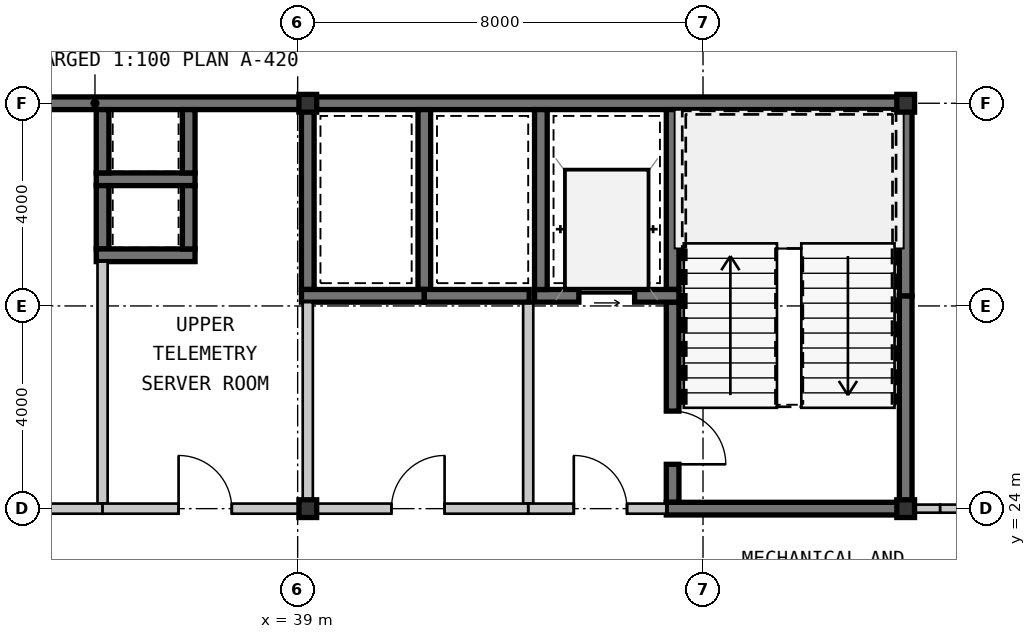
"""IFC4 building model, lengths in metres.
Left out: names, types, materials, properties, quantities, classifications, styles, units other than length and angle.
Written with IfcOpenShell. Run it as: python <this file> out.ifc"""

import sys

from ifc_helpers import new_model, si_unit, direction, frame, frame_2d, origin, origin_2d, place, context, subcontext, project, spatial, rectangle, hollow_rectangle, extrude, source, transform, mapped, element, fill, save


model = new_model("IFC4")
c1 = context("Model", 3, precision=1e-05, world=origin(), true_north=direction((0.0, 1.0)))
c2 = subcontext(c1, "Body", "Model", "MODEL_VIEW")
j1 = project(units=[si_unit("LENGTHUNIT", "METRE"), si_unit("PLANEANGLEUNIT", "RADIAN")], contexts=[c1])
p1 = place(None, origin())
s1 = spatial("IfcSite", under=j1, at=p1, CompositionType="ELEMENT")
p2 = place(p1, origin())
s2 = spatial("IfcBuilding", under=s1, at=p2, CompositionType="ELEMENT")
p3 = place(p2, frame((0.0, 0.0, 207.2)))
s3 = spatial("IfcBuildingStorey", under=s2, at=p3, CompositionType="ELEMENT", Elevation=207.2)
m1 = source(origin(), c2, "Body", "SweptSolid", [
    extrude(hollow_rectangle(XDim=0.35, YDim=0.35, WallThickness=0.016, at=origin_2d()), origin(), (0.0, 0.0, 1.0), 4.2),
])
for number, where, z_axis, x_axis in (
    (1, (39.2, 24.0, 0.0), (0.0, 0.0, 1.0), (1.0, 0.0, 0.0)),
    (2, (51.0, 24.0, 0.0), (0.0, 0.0, 1.0), (1.0, 0.0, 0.0)),
    (3, (39.2, 32.0, 0.0), (0.0, 0.0, 1.0), (1.0, 0.0, 0.0)),
    (4, (51.0, 32.0, 0.0), (0.0, 0.0, 1.0), (1.0, 0.0, 0.0)),
):
    element("IfcColumn", number, at=place(p3, frame(where, z_axis=z_axis, x_axis=x_axis)), inside=s3, PredefinedType="COLUMN", context=c2, shape_type="MappedRepresentation", body=[
        mapped(m1, transform((0.0, 0.0, 0.0), scale=1.0)),
    ])
m2 = source(origin(), c2, "Body", "SweptSolid", [
    extrude(rectangle(XDim=11.2, YDim=0.25, at=frame_2d((5.6, 0.0))), origin(), (0.0, 0.0, 1.0), 3.78),
])
p4 = place(p3, frame((28.0, 32.0, 0.0), z_axis=(0.0, 0.0, 1.0), x_axis=(1.0, 0.0, 0.0)))
e5 = element("IfcWall", 5, at=p4, inside=s3, PredefinedType="SHEAR", context=c2, shape_type="MappedRepresentation", body=[
    mapped(m2, transform((0.0, 0.0, 0.0), scale=1.0)),
])
m3 = source(origin(), c2, "Body", "SweptSolid", [
    extrude(rectangle(XDim=11.925, YDim=0.25, at=frame_2d((5.962, 0.0))), origin(), (0.0, 0.0, 1.0), 3.78),
])
p5 = place(p3, frame((39.2, 32.0, 0.0), z_axis=(0.0, 0.0, 1.0), x_axis=(1.0, 0.0, 0.0)))
e6 = element("IfcWall", 6, at=p5, inside=s3, PredefinedType="SHEAR", context=c2, shape_type="MappedRepresentation", body=[
    mapped(m3, transform((0.0, 0.0, 0.0), scale=1.0)),
])
m4 = source(origin(), c2, "Body", "SweptSolid", [
    extrude(rectangle(XDim=4.075, YDim=0.25, at=frame_2d((2.038, 0.0))), origin(), (0.0, 0.0, 1.0), 3.78),
])
p6 = place(p3, frame((51.0, 24.125, 0.0), z_axis=(0.0, 0.0, 1.0), x_axis=(0.0, 1.0, 0.0)))
e7 = element("IfcWall", 7, at=p6, inside=s3, PredefinedType="SHEAR", context=c2, shape_type="MappedRepresentation", body=[
    mapped(m4, transform((0.0, 0.0, 0.0), scale=1.0)),
])
m5 = source(origin(), c2, "Body", "SweptSolid", [
    extrude(rectangle(XDim=3.675, YDim=0.25, at=frame_2d((1.837, 0.0))), origin(), (0.0, 0.0, 1.0), 3.78),
])
p7 = place(p3, frame((51.0, 28.2, 0.0), z_axis=(0.0, 0.0, 1.0), x_axis=(0.0, 1.0, 0.0)))
e8 = element("IfcWall", 8, at=p7, inside=s3, PredefinedType="SHEAR", context=c2, shape_type="MappedRepresentation", body=[
    mapped(m5, transform((0.0, 0.0, 0.0), scale=1.0)),
])
m6 = source(origin(), c2, "Body", "SweptSolid", [
    extrude(rectangle(XDim=3.55, YDim=0.25, at=frame_2d((1.775, 0.0))), origin(), (0.0, 0.0, 1.0), 3.78),
])
p8 = place(p3, frame((46.4, 31.875, 0.0), z_axis=(0.0, 0.0, 1.0), x_axis=(0.0, -1.0, 0.0)))
e9 = element("IfcWall", 9, at=p8, inside=s3, PredefinedType="SHEAR", context=c2, shape_type="MappedRepresentation", body=[
    mapped(m6, transform((0.0, 0.0, 0.0), scale=1.0)),
])
m7 = source(origin(), c2, "Body", "SweptSolid", [
    extrude(rectangle(XDim=3.95, YDim=0.25, at=frame_2d((1.975, 0.0))), origin(), (0.0, 0.0, 1.0), 3.78),
])
p9 = place(p3, frame((46.4, 28.075, 0.0), z_axis=(0.0, 0.0, 1.0), x_axis=(0.0, -1.0, 0.0)))
e10 = element("IfcWall", 10, at=p9, inside=s3, PredefinedType="SHEAR", context=c2, shape_type="MappedRepresentation", body=[
    mapped(m7, transform((0.0, 0.0, 0.0), scale=1.0)),
])
m8 = source(origin(), c2, "Body", "SweptSolid", [
    extrude(rectangle(XDim=1.05, YDim=2.1, at=frame_2d((0.525, 1.05))), frame((0.0, 0.135, 0.0), z_axis=(0.0, -1.0, 0.0), x_axis=(1.0, 0.0, 0.0)), (0.0, 0.0, 1.0), 0.27),
])
p10 = place(p9, frame((2.15, 0.0, 0.0)))
e11 = element("IfcOpeningElement", 11, at=p10, cuts=e10, PredefinedType="OPENING", context=c2, shape_type="MappedRepresentation", body=[
    mapped(m8, transform((0.0, 0.0, 0.0), scale=1.0)),
])
m9 = source(origin(), c2, "Body", "SweptSolid", [
    extrude(rectangle(XDim=4.85, YDim=0.25, at=frame_2d((2.425, 0.0))), origin(), (0.0, 0.0, 1.0), 3.78),
])
p11 = place(p3, frame((46.275, 24.0, 0.0), z_axis=(0.0, 0.0, 1.0), x_axis=(1.0, 0.0, 0.0)))
e12 = element("IfcWall", 12, at=p11, inside=s3, PredefinedType="SHEAR", context=c2, shape_type="MappedRepresentation", body=[
    mapped(m9, transform((0.0, 0.0, 0.0), scale=1.0)),
])
m10 = source(origin(), c2, "Body", "SweptSolid", [
    extrude(rectangle(XDim=2.85, YDim=0.25, at=frame_2d((1.425, 0.0))), origin(), (0.0, 0.0, 1.0), 3.78),
])
p12 = place(p3, frame((43.675, 28.2, 0.0), z_axis=(0.0, 0.0, 1.0), x_axis=(1.0, 0.0, 0.0)))
e13 = element("IfcWall", 13, at=p12, inside=s3, PredefinedType="SHEAR", context=c2, shape_type="MappedRepresentation", body=[
    mapped(m10, transform((0.0, 0.0, 0.0), scale=1.0)),
])
m11 = source(origin(), c2, "Body", "SweptSolid", [
    extrude(rectangle(XDim=1.1, YDim=2.15, at=frame_2d((0.55, 1.075))), frame((0.0, 0.135, 0.0), z_axis=(0.0, -1.0, 0.0), x_axis=(1.0, 0.0, 0.0)), (0.0, 0.0, 1.0), 0.27),
])
p13 = place(p12, frame((0.875, 0.0, 0.0)))
e14 = element("IfcOpeningElement", 14, at=p13, cuts=e13, PredefinedType="OPENING", context=c2, shape_type="MappedRepresentation", body=[
    mapped(m11, transform((0.0, 0.0, 0.0), scale=1.0)),
])
p14 = place(p3, frame((43.8, 31.875, 0.0), z_axis=(0.0, 0.0, 1.0), x_axis=(0.0, -1.0, 0.0)))
e15 = element("IfcWall", 15, at=p14, inside=s3, PredefinedType="SHEAR", context=c2, shape_type="MappedRepresentation", body=[
    mapped(m6, transform((0.0, 0.0, 0.0), scale=1.0)),
])
m12 = source(origin(), c2, "Body", "SweptSolid", [
    extrude(rectangle(XDim=3.975, YDim=0.2, at=frame_2d((1.987, 0.0))), origin(), (0.0, 0.0, 1.0), 3.78),
])
p15 = place(p3, frame((43.55, 28.075, 0.0), z_axis=(0.0, 0.0, 1.0), x_axis=(0.0, -1.0, 0.0)))
e16 = element("IfcWall", 16, at=p15, inside=s3, PredefinedType="SOLIDWALL", context=c2, shape_type="MappedRepresentation", body=[
    mapped(m12, transform((0.0, 0.0, 0.0), scale=1.0)),
])
m13 = source(origin(), c2, "Body", "SweptSolid", [
    extrude(rectangle(XDim=2.725, YDim=0.2, at=frame_2d((1.362, 0.0))), origin(), (0.0, 0.0, 1.0), 3.247),
])
p16 = place(p3, frame((43.55, 24.0, 0.0), z_axis=(0.0, 0.0, 1.0), x_axis=(1.0, 0.0, 0.0)))
e17 = element("IfcWall", 17, at=p16, inside=s3, PredefinedType="SOLIDWALL", context=c2, shape_type="MappedRepresentation", body=[
    mapped(m13, transform((0.0, 0.0, 0.0), scale=1.0)),
])
m14 = source(origin(), c2, "Body", "SweptSolid", [
    extrude(rectangle(XDim=1.05, YDim=2.1, at=frame_2d((0.525, 1.05))), frame((0.0, 0.11, 0.0), z_axis=(0.0, -1.0, 0.0), x_axis=(1.0, 0.0, 0.0)), (0.0, 0.0, 1.0), 0.22),
])
p17 = place(p16, frame((0.9, 0.0, 0.0)))
e18 = element("IfcOpeningElement", 18, at=p17, cuts=e17, PredefinedType="OPENING", context=c2, shape_type="MappedRepresentation", body=[
    mapped(m14, transform((0.0, 0.0, 0.0), scale=1.0)),
])
m15 = source(origin(), c2, "Body", "SweptSolid", [
    extrude(rectangle(XDim=1.95, YDim=0.25, at=frame_2d((0.975, 0.0))), origin(), (0.0, 0.0, 1.0), 3.78),
])
p18 = place(p3, frame((35.025, 30.5, 0.0), z_axis=(0.0, 0.0, 1.0), x_axis=(1.0, 0.0, 0.0)))
e19 = element("IfcWall", 19, at=p18, inside=s3, PredefinedType="SHEAR", context=c2, shape_type="MappedRepresentation", body=[
    mapped(m15, transform((0.0, 0.0, 0.0), scale=1.0)),
])
m16 = source(origin(), c2, "Body", "SweptSolid", [
    extrude(rectangle(XDim=1.25, YDim=0.25, at=frame_2d((0.625, 0.0))), origin(), (0.0, 0.0, 1.0), 3.78),
])
for number, where, z_axis, x_axis in (
    (20, (35.15, 31.875, 0.0), (0.0, 0.0, 1.0), (0.0, -1.0, 0.0)),
    (21, (36.85, 30.625, 0.0), (0.0, 0.0, 1.0), (0.0, 1.0, 0.0)),
    (22, (35.15, 30.375, 0.0), (0.0, 0.0, 1.0), (0.0, -1.0, 0.0)),
):
    element("IfcWall", number, at=place(p3, frame(where, z_axis=z_axis, x_axis=x_axis)), inside=s3, PredefinedType="SHEAR", context=c2, shape_type="MappedRepresentation", body=[
        mapped(m16, transform((0.0, 0.0, 0.0), scale=1.0)),
    ])
p19 = place(p3, frame((35.025, 29.0, 0.0), z_axis=(0.0, 0.0, 1.0), x_axis=(1.0, 0.0, 0.0)))
e23 = element("IfcWall", 23, at=p19, inside=s3, PredefinedType="SHEAR", context=c2, shape_type="MappedRepresentation", body=[
    mapped(m15, transform((0.0, 0.0, 0.0), scale=1.0)),
])
p20 = place(p3, frame((36.85, 29.125, 0.0), z_axis=(0.0, 0.0, 1.0), x_axis=(0.0, 1.0, 0.0)))
e24 = element("IfcWall", 24, at=p20, inside=s3, PredefinedType="SHEAR", context=c2, shape_type="MappedRepresentation", body=[
    mapped(m16, transform((0.0, 0.0, 0.0), scale=1.0)),
])
m17 = source(origin(), c2, "Body", "SweptSolid", [
    extrude(rectangle(XDim=4.775, YDim=0.2, at=frame_2d((2.387, 0.0))), origin(), (0.0, 0.0, 1.0), 3.78),
])
p21 = place(p3, frame((35.15, 28.875, 0.0), z_axis=(0.0, 0.0, 1.0), x_axis=(0.0, -1.0, 0.0)))
e25 = element("IfcWall", 25, at=p21, inside=s3, PredefinedType="SOLIDWALL", context=c2, shape_type="MappedRepresentation", body=[
    mapped(m17, transform((0.0, 0.0, 0.0), scale=1.0)),
])
m18 = source(origin(), c2, "Body", "SweptSolid", [
    extrude(rectangle(XDim=3.35, YDim=0.2, at=frame_2d((1.675, 0.0))), origin(), (0.0, 0.0, 1.0), 3.32),
])
p22 = place(p3, frame((35.15, 24.0, 0.0), z_axis=(0.0, 0.0, 1.0), x_axis=(-1.0, 0.0, 0.0)))
e26 = element("IfcWall", 26, at=p22, inside=s3, PredefinedType="SOLIDWALL", context=c2, shape_type="MappedRepresentation", body=[
    mapped(m18, transform((0.0, 0.0, 0.0), scale=1.0)),
])
p23 = place(p22, frame((1.15, 0.0, 0.0)))
e27 = element("IfcOpeningElement", 27, at=p23, cuts=e26, PredefinedType="OPENING", context=c2, shape_type="MappedRepresentation", body=[
    mapped(m14, transform((0.0, 0.0, 0.0), scale=1.0)),
])
for number, where, z_axis, x_axis in (
    (28, (41.5, 28.325, 0.0), (0.0, 0.0, 1.0), (0.0, 1.0, 0.0)),
    (29, (39.2, 31.875, 0.0), (0.0, 0.0, 1.0), (0.0, -1.0, 0.0)),
):
    element("IfcWall", number, at=place(p3, frame(where, z_axis=z_axis, x_axis=x_axis)), inside=s3, PredefinedType="SHEAR", context=c2, shape_type="MappedRepresentation", body=[
        mapped(m6, transform((0.0, 0.0, 0.0), scale=1.0)),
    ])
m19 = source(origin(), c2, "Body", "SweptSolid", [
    extrude(rectangle(XDim=2.425, YDim=0.25, at=frame_2d((1.212, 0.0))), origin(), (0.0, 0.0, 1.0), 3.78),
])
p24 = place(p3, frame((39.075, 28.2, 0.0), z_axis=(0.0, 0.0, 1.0), x_axis=(1.0, 0.0, 0.0)))
e30 = element("IfcWall", 30, at=p24, inside=s3, PredefinedType="SHEAR", context=c2, shape_type="MappedRepresentation", body=[
    mapped(m19, transform((0.0, 0.0, 0.0), scale=1.0)),
])
m20 = source(origin(), c2, "Body", "SweptSolid", [
    extrude(rectangle(XDim=2.07, YDim=0.25, at=frame_2d((1.035, 0.0))), origin(), (0.0, 0.0, 1.0), 3.78),
])
p25 = place(p3, frame((41.5, 28.2, 0.0), z_axis=(0.0, 0.0, 1.0), x_axis=(1.0, 0.0, 0.0)))
e31 = element("IfcWall", 31, at=p25, inside=s3, PredefinedType="SHEAR", context=c2, shape_type="MappedRepresentation", body=[
    mapped(m20, transform((0.0, 0.0, 0.0), scale=1.0)),
])
m21 = source(origin(), c2, "Body", "SweptSolid", [
    extrude(rectangle(XDim=3.975, YDim=0.2, at=frame_2d((1.987, 0.0))), origin(), (0.0, 0.0, 1.0), 3.32),
])
p26 = place(p3, frame((39.2, 28.075, 0.0), z_axis=(0.0, 0.0, 1.0), x_axis=(0.0, -1.0, 0.0)))
e32 = element("IfcWall", 32, at=p26, inside=s3, PredefinedType="SOLIDWALL", context=c2, shape_type="MappedRepresentation", body=[
    mapped(m21, transform((0.0, 0.0, 0.0), scale=1.0)),
])
m22 = source(origin(), c2, "Body", "SweptSolid", [
    extrude(rectangle(XDim=4.05, YDim=0.2, at=frame_2d((2.025, 0.0))), origin(), (0.0, 0.0, 1.0), 3.32),
])
p27 = place(p3, frame((39.2, 24.0, 0.0), z_axis=(0.0, 0.0, 1.0), x_axis=(-1.0, 0.0, 0.0)))
e33 = element("IfcWall", 33, at=p27, inside=s3, PredefinedType="SOLIDWALL", context=c2, shape_type="MappedRepresentation", body=[
    mapped(m22, transform((0.0, 0.0, 0.0), scale=1.0)),
])
p28 = place(p27, frame((1.5, 0.0, 0.0)))
e34 = element("IfcOpeningElement", 34, at=p28, cuts=e33, PredefinedType="OPENING", context=c2, shape_type="MappedRepresentation", body=[
    mapped(m14, transform((0.0, 0.0, 0.0), scale=1.0)),
])
m23 = source(origin(), c2, "Body", "SweptSolid", [
    extrude(rectangle(XDim=4.35, YDim=0.2, at=frame_2d((2.175, 0.0))), origin(), (0.0, 0.0, 1.0), 3.247),
])
p29 = place(p3, frame((43.55, 24.0, 0.0), z_axis=(0.0, 0.0, 1.0), x_axis=(-1.0, 0.0, 0.0)))
e35 = element("IfcWall", 35, at=p29, inside=s3, PredefinedType="SOLIDWALL", context=c2, shape_type="MappedRepresentation", body=[
    mapped(m23, transform((0.0, 0.0, 0.0), scale=1.0)),
])
p30 = place(p29, frame((1.65, 0.0, 0.0)))
e36 = element("IfcOpeningElement", 36, at=p30, cuts=e35, PredefinedType="OPENING", context=c2, shape_type="MappedRepresentation", body=[
    mapped(m14, transform((0.0, 0.0, 0.0), scale=1.0)),
])
m24 = source(origin(), c2, "Body", "SweptSolid", [
    extrude(rectangle(XDim=0.556, YDim=0.16, at=frame_2d((0.278, 0.0))), origin(), (0.0, 0.0, 1.0), 3.32),
])
p31 = place(p3, frame((51.125, 24.0, 0.0), z_axis=(0.0, 0.0, 1.0), x_axis=(1.0, 0.0, 0.0)))
e37 = element("IfcWall", 37, at=p31, inside=s3, PredefinedType="PARTITIONING", context=c2, shape_type="MappedRepresentation", body=[
    mapped(m24, transform((0.0, 0.0, 0.0), scale=1.0)),
])
m25 = source(origin(), c2, "Body", "SweptSolid", [
    extrude(rectangle(XDim=6.239, YDim=0.16, at=frame_2d((3.12, 0.0))), origin(), (0.0, 0.0, 1.0), 3.78),
])
p32 = place(p3, frame((51.681, 24.0, 0.0), z_axis=(0.0, 0.0, 1.0), x_axis=(1.0, 0.0, 0.0)))
e38 = element("IfcWall", 38, at=p32, inside=s3, PredefinedType="PARTITIONING", context=c2, shape_type="MappedRepresentation", body=[
    mapped(m25, transform((0.0, 0.0, 0.0), scale=1.0)),
])
m26 = source(origin(), c2, "Body", "SweptSolid", [
    extrude(rectangle(XDim=1.05, YDim=2.1, at=frame_2d((0.525, 1.05))), frame((0.0, 0.09, 0.0), z_axis=(0.0, -1.0, 0.0), x_axis=(1.0, 0.0, 0.0)), (0.0, 0.0, 1.0), 0.18),
])
p33 = place(p32, frame((2.264, 0.0, 0.0)))
e39 = element("IfcOpeningElement", 39, at=p33, cuts=e38, PredefinedType="OPENING", context=c2, shape_type="MappedRepresentation", body=[
    mapped(m26, transform((0.0, 0.0, 0.0), scale=1.0)),
])
m27 = source(origin(), c2, "Body", "SweptSolid", [
    extrude(rectangle(XDim=1.05, YDim=2.1, at=frame_2d((0.525, 1.05))), frame((0.0, 0.025, 0.0), z_axis=(0.0, -1.0, 0.0), x_axis=(1.0, 0.0, 0.0)), (0.0, 0.0, 1.0), 0.05),
])
p34 = place(p10, origin())
e40 = element("IfcDoor", 40, at=p34, inside=s3, OperationType="SINGLE_SWING_RIGHT", PredefinedType="DOOR", context=c2, shape_type="MappedRepresentation", body=[
    mapped(m27, transform((0.0, 0.0, 0.0), scale=1.0)),
])
fill(e11, e40)
m28 = source(origin(), c2, "Body", "SweptSolid", [
    extrude(rectangle(XDim=1.1, YDim=2.15, at=frame_2d((0.55, 1.075))), frame((0.0, 0.025, 0.0), z_axis=(0.0, -1.0, 0.0), x_axis=(1.0, 0.0, 0.0)), (0.0, 0.0, 1.0), 0.05),
])
p35 = place(p13, origin())
e41 = element("IfcDoor", 41, at=p35, inside=s3, OperationType="SLIDING_TO_LEFT", PredefinedType="DOOR", context=c2, shape_type="MappedRepresentation", body=[
    mapped(m28, transform((0.0, 0.0, 0.0), scale=1.0)),
])
fill(e14, e41)
p36 = place(p17, origin())
e42 = element("IfcDoor", 42, at=p36, inside=s3, OperationType="SINGLE_SWING_LEFT", PredefinedType="DOOR", context=c2, shape_type="MappedRepresentation", body=[
    mapped(m27, transform((0.0, 0.0, 0.0), scale=1.0)),
])
fill(e18, e42)
p37 = place(p28, frame((1.05, 0.0, 0.0), z_axis=(0.0, 0.0, 1.0), x_axis=(-1.0, 0.0, 0.0)))
e43 = element("IfcDoor", 43, at=p37, inside=s3, OperationType="SINGLE_SWING_LEFT", PredefinedType="DOOR", context=c2, shape_type="MappedRepresentation", body=[
    mapped(m27, transform((0.0, 0.0, 0.0), scale=1.0)),
])
fill(e34, e43)
p38 = place(p30, frame((1.05, 0.0, 0.0), z_axis=(0.0, 0.0, 1.0), x_axis=(-1.0, 0.0, 0.0)))
e44 = element("IfcDoor", 44, at=p38, inside=s3, OperationType="SINGLE_SWING_RIGHT", PredefinedType="DOOR", context=c2, shape_type="MappedRepresentation", body=[
    mapped(m27, transform((0.0, 0.0, 0.0), scale=1.0)),
])
fill(e36, e44)
save(model, sys.argv[1])
